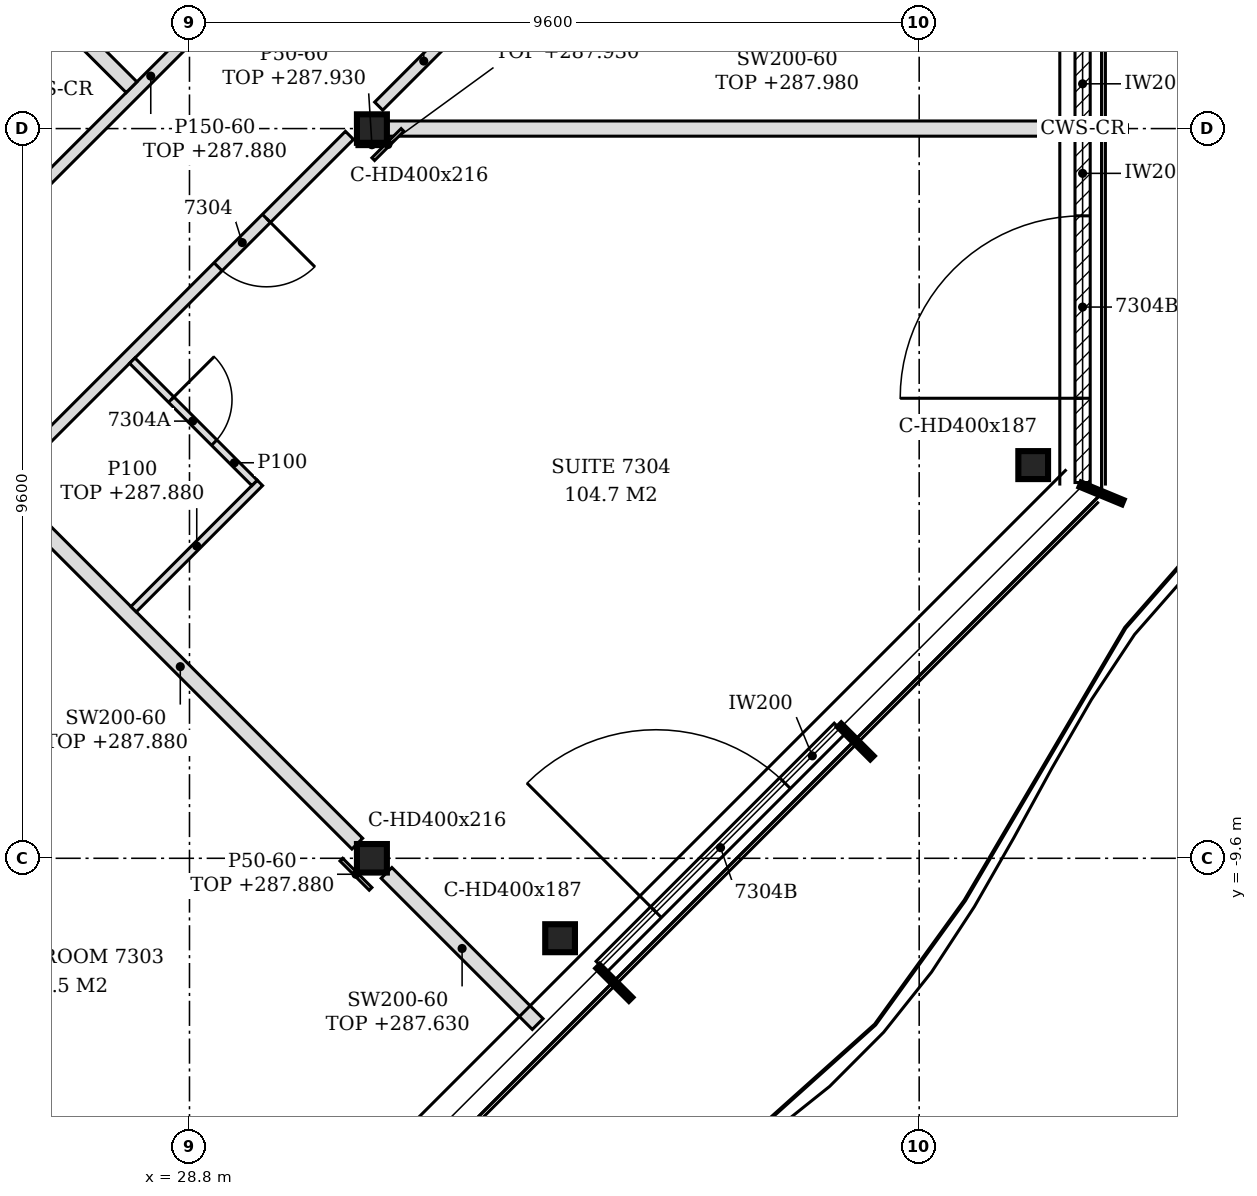
"""IFC4 building model, lengths in metres.
Left out: names, types, materials, properties, quantities, classifications, styles, units other than length and angle.
Written with IfcOpenShell. Run it as: python <this file> out.ifc"""

import sys

from ifc_helpers import new_model, si_unit, direction, frame, frame_2d, origin, origin_2d, place, context, subcontext, project, spatial, polyline, rectangle, i_section, outline, extrude, element, fill, save


model = new_model("IFC4")
c1 = context("Model", 3, precision=1e-05, world=origin(), true_north=direction((0.0, 1.0)))
c2 = subcontext(c1, "Body", "Model", "MODEL_VIEW")
j1 = project(units=[si_unit("LENGTHUNIT", "METRE"), si_unit("PLANEANGLEUNIT", "RADIAN")], contexts=[c1])
p1 = place(None, origin())
s1 = spatial("IfcSite", under=j1, at=p1, CompositionType="ELEMENT")
p2 = place(p1, origin())
s2 = spatial("IfcBuilding", under=s1, at=p2, CompositionType="ELEMENT")
p3 = place(p2, frame((0.0, 0.0, 285.0)))
s3 = spatial("IfcBuildingStorey", under=s2, at=p3, CompositionType="ELEMENT", Elevation=285.0)
for number, where, z_axis, x_axis in (
    (1, (33.676, -10.652, -0.15), (0.0, 0.0, 1.0), (1.0, 0.0, 0.0)),
    (2, (39.9, -4.427, -0.15), (0.0, 0.0, 1.0), (1.0, 0.0, 0.0)),
):
    element("IfcColumn", number, at=place(p3, frame(where, z_axis=z_axis, x_axis=x_axis)), inside=s3, PredefinedType="COLUMN", context=c2, shape_type="SweptSolid", body=[
        extrude(i_section(OverallWidth=0.391, OverallDepth=0.368, WebThickness=0.015, FlangeThickness=0.024, FilletRadius=0.015, at=origin_2d()), origin(), (0.0, 0.0, 1.0), 3.6),
    ])
for number, where, z_axis, x_axis in (
    (3, (31.2, -9.6, -0.15), (0.0, 0.0, 1.0), (1.0, 0.0, 0.0)),
    (4, (31.2, 0.0, -0.15), (0.0, 0.0, 1.0), (1.0, 0.0, 0.0)),
):
    element("IfcColumn", number, at=place(p3, frame(where, z_axis=z_axis, x_axis=x_axis)), inside=s3, PredefinedType="COLUMN", context=c2, shape_type="SweptSolid", body=[
        extrude(i_section(OverallWidth=0.394, OverallDepth=0.375, WebThickness=0.017, FlangeThickness=0.028, FilletRadius=0.015, at=origin_2d()), origin(), (0.0, 0.0, 1.0), 3.6),
    ])
p4 = place(p3, frame((34.22, -11.026, 0.0), z_axis=(0.0, 0.0, 1.0), x_axis=(0.707134329907, 0.707079231393, 0.0)))
e5 = element("IfcWall", 5, at=p4, inside=s3, PredefinedType="NOTDEFINED", context=c2, shape_type="SweptSolid", body=[
    extrude(rectangle(XDim=4.431, YDim=0.2, at=frame_2d((2.215, 0.0))), origin(), (0.0, 0.0, 1.0), 3.45),
])
p5 = place(p4, frame((1.015, 0.0, 0.0)))
e6 = element("IfcOpeningElement", 6, at=p5, cuts=e5, PredefinedType="OPENING", context=c2, shape_type="SweptSolid", body=[
    extrude(rectangle(XDim=2.4, YDim=2.4, at=frame_2d((1.2, 1.2))), frame((0.0, 0.11, 0.0), z_axis=(0.0, -1.0, 0.0), x_axis=(1.0, 0.0, 0.0)), (0.0, 0.0, 1.0), 0.22),
])
p6 = place(p3, frame((40.55, -4.656, 0.0), z_axis=(0.0, 0.0, 1.0), x_axis=(0.0, 1.0, 0.0)))
e7 = element("IfcWall", 7, at=p6, inside=s3, PredefinedType="NOTDEFINED", context=c2, shape_type="SweptSolid", body=[
    extrude(rectangle(XDim=4.626, YDim=0.2, at=frame_2d((2.313, 0.0))), origin(), (0.0, 0.0, 1.0), 3.45),
])
p7 = place(p6, frame((1.108, 0.0, 0.0)))
e8 = element("IfcOpeningElement", 8, at=p7, cuts=e7, PredefinedType="OPENING", context=c2, shape_type="SweptSolid", body=[
    extrude(rectangle(XDim=2.4, YDim=2.4, at=frame_2d((1.2, 1.2))), frame((0.0, 0.11, 0.0), z_axis=(0.0, -1.0, 0.0), x_axis=(1.0, 0.0, 0.0)), (0.0, 0.0, 1.0), 0.22),
])
p8 = place(p3, frame((40.55, 0.03, 0.0), z_axis=(0.0, 0.0, 1.0), x_axis=(0.0, 1.0, 0.0)))
e9 = element("IfcWall", 9, at=p8, inside=s3, PredefinedType="NOTDEFINED", context=c2, shape_type="SweptSolid", body=[
    extrude(rectangle(XDim=4.626, YDim=0.2, at=frame_2d((2.313, 0.0))), origin(), (0.0, 0.0, 1.0), 3.45),
])
p9 = place(p8, frame((1.118, 0.0, 0.0)))
e10 = element("IfcOpeningElement", 10, at=p9, cuts=e9, PredefinedType="OPENING", context=c2, shape_type="SweptSolid", body=[
    extrude(rectangle(XDim=2.4, YDim=2.4, at=frame_2d((1.2, 1.2))), frame((0.0, 0.11, 0.0), z_axis=(0.0, -1.0, 0.0), x_axis=(1.0, 0.0, 0.0)), (0.0, 0.0, 1.0), 0.22),
])
p10 = place(p3, frame((27.262, -16.686, 0.0), z_axis=(0.0, 0.0, 1.0), x_axis=(-0.707106781187, 0.707106781187, 0.0)))
e11 = element("IfcWall", 11, at=p10, inside=s3, PredefinedType="PARTITIONING", context=c2, shape_type="SweptSolid", body=[
    extrude(rectangle(XDim=9.085, YDim=0.2, at=frame_2d((4.542, 0.0))), origin(), (0.0, 0.0, 1.0), 2.93),
])
p11 = place(p3, frame((15.497, -15.497, 0.0), z_axis=(0.0, 0.0, 1.0), x_axis=(0.707106781187, 0.707106781187, 0.0)))
e12 = element("IfcWall", 12, at=p11, inside=s3, PredefinedType="PARTITIONING", context=c2, shape_type="SweptSolid", body=[
    extrude(rectangle(XDim=21.79, YDim=0.15, at=frame_2d((10.895, 0.0))), origin(), (0.0, 0.0, 1.0), 2.73),
])
p12 = place(p11, frame((4.927, 0.0, 0.0)))
e13 = element("IfcOpeningElement", 13, at=p12, cuts=e12, PredefinedType="OPENING", context=c2, shape_type="SweptSolid", body=[
    extrude(rectangle(XDim=0.9, YDim=2.1, at=frame_2d((0.45, 1.05))), frame((0.0, 0.085, 0.0), z_axis=(0.0, -1.0, 0.0), x_axis=(1.0, 0.0, 0.0)), (0.0, 0.0, 1.0), 0.17),
])
p13 = place(p11, frame((10.926, 0.0, 0.0)))
e14 = element("IfcOpeningElement", 14, at=p13, cuts=e12, PredefinedType="OPENING", context=c2, shape_type="SweptSolid", body=[
    extrude(rectangle(XDim=0.9, YDim=2.1, at=frame_2d((0.45, 1.05))), frame((0.0, 0.085, 0.0), z_axis=(0.0, -1.0, 0.0), x_axis=(1.0, 0.0, 0.0)), (0.0, 0.0, 1.0), 0.17),
])
p14 = place(p11, frame((19.345, 0.0, 0.0)))
e15 = element("IfcOpeningElement", 15, at=p14, cuts=e12, PredefinedType="OPENING", context=c2, shape_type="SweptSolid", body=[
    extrude(rectangle(XDim=0.9, YDim=2.1, at=frame_2d((0.45, 1.05))), frame((0.0, 0.085, 0.0), z_axis=(0.0, -1.0, 0.0), x_axis=(1.0, 0.0, 0.0)), (0.0, 0.0, 1.0), 0.17),
])
p15 = place(p3, frame((33.381, -11.781, 0.0), z_axis=(0.0, 0.0, 1.0), x_axis=(-0.707106781187, 0.707106781187, 0.0)))
e16 = element("IfcWall", 16, at=p15, inside=s3, PredefinedType="PARTITIONING", context=c2, shape_type="SweptSolid", body=[
    extrude(rectangle(XDim=2.812, YDim=0.2, at=frame_2d((1.406, 0.0))), origin(), (0.0, 0.0, 1.0), 2.63),
])
p16 = place(p3, frame((31.008, -9.408, 0.0), z_axis=(0.0, 0.0, 1.0), x_axis=(-0.707106781187, 0.707106781187, 0.0)))
e17 = element("IfcWall", 17, at=p16, inside=s3, PredefinedType="PARTITIONING", context=c2, shape_type="SweptSolid", body=[
    extrude(rectangle(XDim=6.587, YDim=0.2, at=frame_2d((3.293, 0.0))), origin(), (0.0, 0.0, 1.0), 2.88),
])
p17 = place(p3, frame((28.065, -6.323, 0.0), z_axis=(0.0, 0.0, 1.0), x_axis=(0.707106781187, 0.707106781187, 0.0)))
e18 = element("IfcWall", 18, at=p17, inside=s3, PredefinedType="PARTITIONING", context=c2, shape_type="SweptSolid", body=[
    extrude(rectangle(XDim=2.35, YDim=0.1, at=frame_2d((1.175, 0.0))), origin(), (0.0, 0.0, 1.0), 2.88),
])
p18 = place(p3, frame((29.656, -4.662, 0.0), z_axis=(0.0, 0.0, 1.0), x_axis=(-0.707053116953, 0.707160441348, 0.0)))
e19 = element("IfcWall", 19, at=p18, inside=s3, PredefinedType="PARTITIONING", context=c2, shape_type="SweptSolid", body=[
    extrude(rectangle(XDim=2.275, YDim=0.1, at=frame_2d((1.137, 0.0))), origin(), (0.0, 0.0, 1.0), 3.45),
])
p19 = place(p18, frame((0.75, 0.0, 0.0)))
e20 = element("IfcOpeningElement", 20, at=p19, cuts=e19, PredefinedType="OPENING", context=c2, shape_type="SweptSolid", body=[
    extrude(rectangle(XDim=0.8, YDim=2.1, at=frame_2d((0.4, 1.05))), frame((0.0, 0.06, 0.0), z_axis=(0.0, -1.0, 0.0), x_axis=(1.0, 0.0, 0.0)), (0.0, 0.0, 1.0), 0.12),
])
p20 = place(p3, frame((26.528, -1.072, 0.0), z_axis=(0.0, 0.0, 1.0), x_axis=(0.707106781187, 0.707106781187, 0.0)))
e21 = element("IfcWall", 21, at=p20, inside=s3, PredefinedType="PARTITIONING", context=c2, shape_type="SweptSolid", body=[
    extrude(rectangle(XDim=4.985, YDim=0.15, at=frame_2d((2.492, 0.0))), origin(), (0.0, 0.0, 1.0), 2.88),
])
p21 = place(p3, frame((31.397, 0.0, 0.0), z_axis=(0.0, 0.0, 1.0), x_axis=(1.0, 0.0, 0.0)))
e22 = element("IfcWall", 22, at=p21, inside=s3, PredefinedType="PARTITIONING", context=c2, shape_type="SweptSolid", body=[
    extrude(outline(polyline([(0.0, 0.0), (9.053, 0.0), (9.053, 2.98), (8.653, 2.98), (8.651, 2.93), (8.353, 2.93), (8.351, 2.98), (0.0, 2.98), (0.0, 0.0)])), frame((0.0, 0.1, 0.0), z_axis=(0.0, -1.0, 0.0), x_axis=(1.0, 0.0, 0.0)), (0.0, 0.0, 1.0), 0.2),
])
p22 = place(p3, frame((31.289, 0.295, 0.0), z_axis=(0.0, 0.0, 1.0), x_axis=(0.707179577478, 0.7070339774, 0.0)))
e23 = element("IfcWall", 23, at=p22, inside=s3, PredefinedType="PARTITIONING", context=c2, shape_type="SweptSolid", body=[
    extrude(rectangle(XDim=1.677, YDim=0.15, at=frame_2d((0.838, 0.0))), origin(), (0.0, 0.0, 1.0), 2.93),
])
p23 = place(p3, frame((28.038, 0.544, 0.0), z_axis=(0.0, 0.0, 1.0), x_axis=(-0.707213699878, 0.706999846325, 0.0)))
e24 = element("IfcWall", 24, at=p23, inside=s3, PredefinedType="PARTITIONING", context=c2, shape_type="SweptSolid", body=[
    extrude(rectangle(XDim=3.425, YDim=0.2, at=frame_2d((1.712, 0.0))), origin(), (0.0, 0.0, 1.0), 3.45),
])
p24 = place(p3, frame((31.218, -0.402, 0.0), z_axis=(0.0, 0.0, 1.0), x_axis=(0.707106781187, 0.707106781187, 0.0)))
e25 = element("IfcWall", 25, at=p24, inside=s3, PredefinedType="PARTITIONING", context=c2, shape_type="SweptSolid", body=[
    extrude(rectangle(XDim=0.544, YDim=0.05, at=frame_2d((0.272, 0.0))), origin(), (0.0, 0.0, 1.0), 2.93),
])
p25 = place(p3, frame((31.182, -10.002, 0.0), z_axis=(0.0, 0.0, 1.0), x_axis=(-0.707106781187, 0.707106781187, 0.0)))
e26 = element("IfcWall", 26, at=p25, inside=s3, PredefinedType="PARTITIONING", context=c2, shape_type="SweptSolid", body=[
    extrude(rectangle(XDim=0.544, YDim=0.05, at=frame_2d((0.272, 0.0))), origin(), (0.0, 0.0, 1.0), 2.88),
])
p26 = place(p3, frame((31.003, -0.212, 0.0), z_axis=(0.0, 0.0, 1.0), x_axis=(1.0, 0.0, 0.0)))
e27 = element("IfcWall", 27, at=p26, inside=s3, PredefinedType="PARTITIONING", context=c2, shape_type="SweptSolid", body=[
    extrude(rectangle(XDim=0.394, YDim=0.05, at=frame_2d((0.197, 0.0))), origin(), (0.0, 0.0, 1.0), 2.93),
])
p27 = place(p5, origin())
e28 = element("IfcDoor", 28, at=p27, inside=s3, OperationType="SINGLE_SWING_LEFT", PredefinedType="DOOR", context=c2, shape_type="SweptSolid", body=[
    extrude(rectangle(XDim=2.4, YDim=2.4, at=frame_2d((1.2, 1.2))), frame((0.0, 0.025, 0.0), z_axis=(0.0, -1.0, 0.0), x_axis=(1.0, 0.0, 0.0)), (0.0, 0.0, 1.0), 0.05),
])
fill(e6, e28)
p28 = place(p7, origin())
e29 = element("IfcDoor", 29, at=p28, inside=s3, OperationType="SINGLE_SWING_LEFT", PredefinedType="DOOR", context=c2, shape_type="SweptSolid", body=[
    extrude(rectangle(XDim=2.4, YDim=2.4, at=frame_2d((1.2, 1.2))), frame((0.0, 0.025, 0.0), z_axis=(0.0, -1.0, 0.0), x_axis=(1.0, 0.0, 0.0)), (0.0, 0.0, 1.0), 0.05),
])
fill(e8, e29)
p29 = place(p14, frame((0.9, 0.0, 0.0), z_axis=(0.0, 0.0, 1.0), x_axis=(-1.0, 0.0, 0.0)))
e30 = element("IfcDoor", 30, at=p29, inside=s3, OperationType="SINGLE_SWING_LEFT", PredefinedType="DOOR", context=c2, shape_type="SweptSolid", body=[
    extrude(rectangle(XDim=0.9, YDim=2.1, at=frame_2d((0.45, 1.05))), frame((0.0, 0.025, 0.0), z_axis=(0.0, -1.0, 0.0), x_axis=(1.0, 0.0, 0.0)), (0.0, 0.0, 1.0), 0.05),
])
fill(e15, e30)
p30 = place(p19, frame((0.8, 0.0, 0.0), z_axis=(0.0, 0.0, 1.0), x_axis=(-1.0, 0.0, 0.0)))
e31 = element("IfcDoor", 31, at=p30, inside=s3, OperationType="SINGLE_SWING_LEFT", PredefinedType="DOOR", context=c2, shape_type="SweptSolid", body=[
    extrude(rectangle(XDim=0.8, YDim=2.1, at=frame_2d((0.4, 1.05))), frame((0.0, 0.025, 0.0), z_axis=(0.0, -1.0, 0.0), x_axis=(1.0, 0.0, 0.0)), (0.0, 0.0, 1.0), 0.05),
])
fill(e20, e31)
save(model, sys.argv[1])
